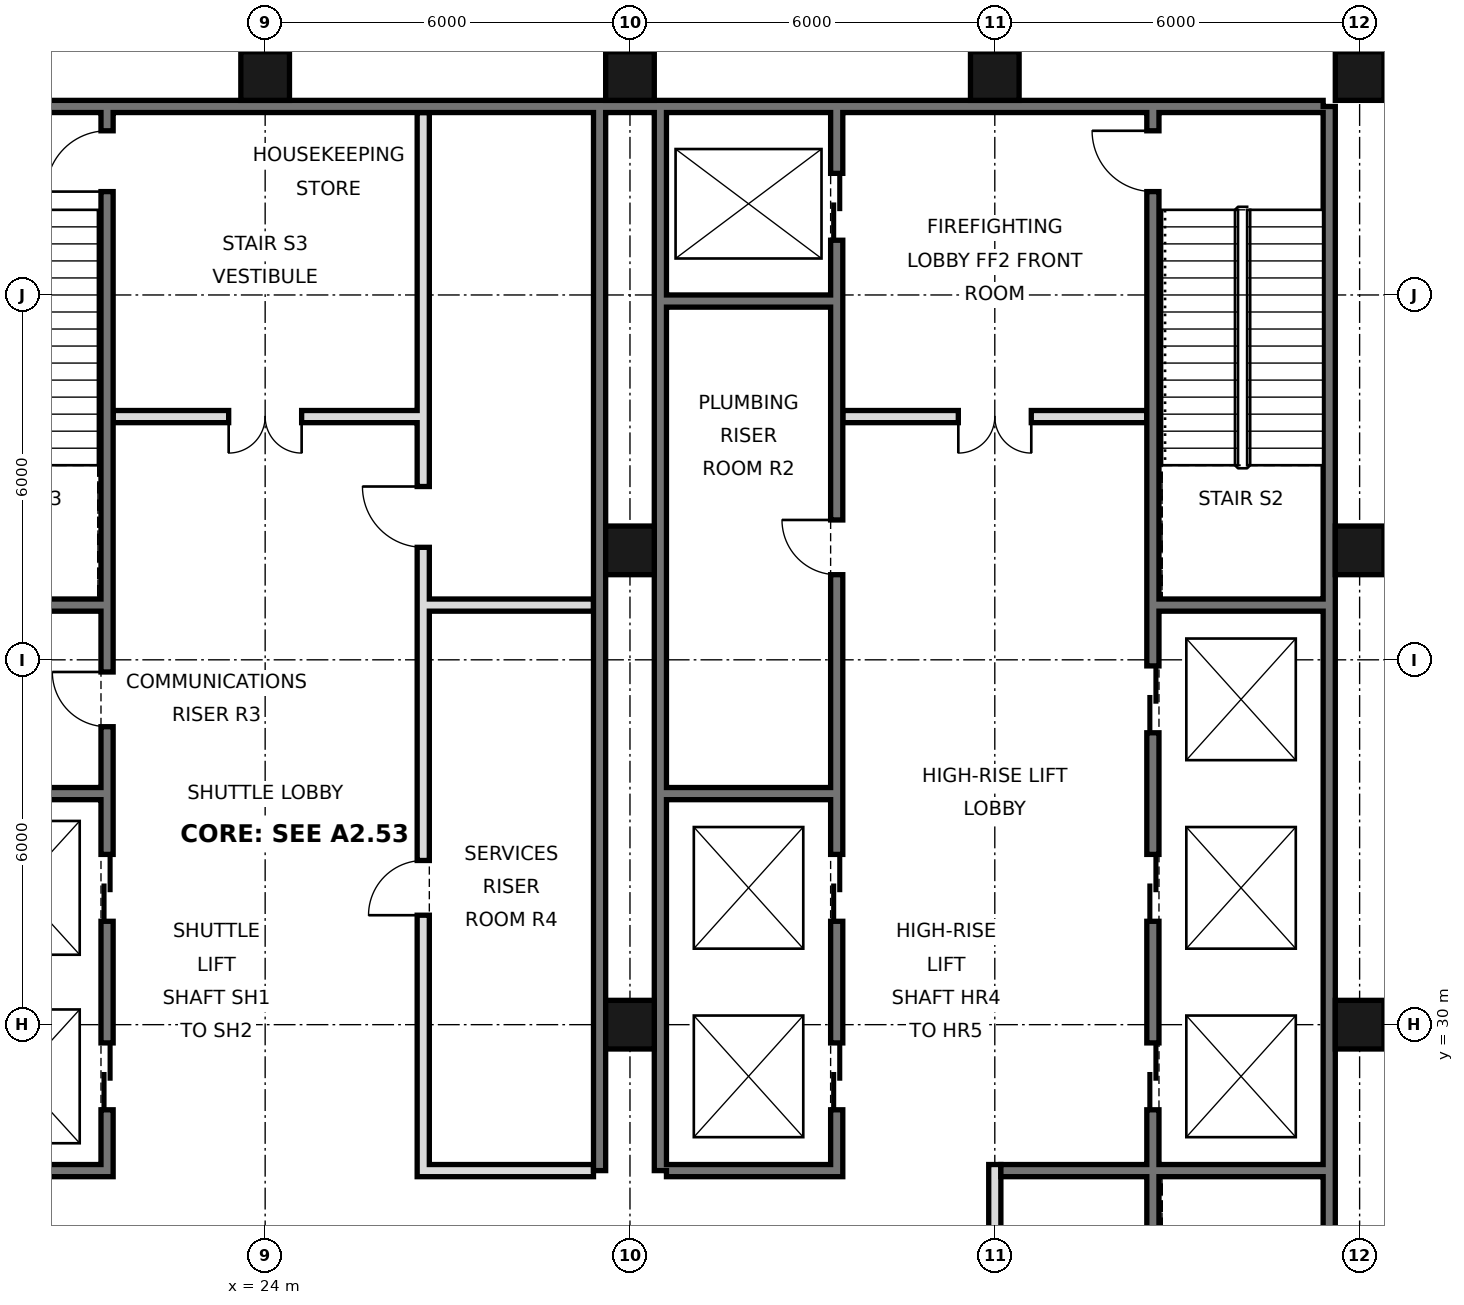
"""IFC4 building model, lengths in metres.
Left out: names, types, materials, properties, quantities, classifications, styles, units other than length and angle.
Written with IfcOpenShell. Run it as: python <this file> out.ifc"""

import sys

from ifc_helpers import new_model, si_unit, direction, frame, frame_2d, origin, origin_2d, place, context, subcontext, project, spatial, rectangle, hollow_rectangle, extrude, element, fill, save


model = new_model("IFC4")
c1 = context("Model", 3, precision=1e-05, world=origin(), true_north=direction((0.0, 1.0)))
c2 = subcontext(c1, "Body", "Model", "MODEL_VIEW")
j1 = project(units=[si_unit("LENGTHUNIT", "METRE"), si_unit("PLANEANGLEUNIT", "RADIAN")], contexts=[c1])
p1 = place(None, origin())
s1 = spatial("IfcSite", under=j1, at=p1, CompositionType="ELEMENT")
p2 = place(p1, origin())
s2 = spatial("IfcBuilding", under=s1, at=p2, CompositionType="ELEMENT")
p3 = place(p2, frame((0.0, 0.0, 210.0)))
s3 = spatial("IfcBuildingStorey", under=s2, at=p3, CompositionType="ELEMENT", Elevation=210.0)
for number, where, z_axis, x_axis in (
    (1, (24.0, 45.6, 0.0), (0.0, 0.0, 1.0), (1.0, 0.0, 0.0)),
    (2, (30.0, 30.0, 0.0), (0.0, 0.0, 1.0), (1.0, 0.0, 0.0)),
    (3, (30.0, 37.8, 0.0), (0.0, 0.0, 1.0), (1.0, 0.0, 0.0)),
    (4, (30.0, 45.6, 0.0), (0.0, 0.0, 1.0), (1.0, 0.0, 0.0)),
    (5, (36.0, 45.6, 0.0), (0.0, 0.0, 1.0), (1.0, 0.0, 0.0)),
    (6, (42.0, 30.0, 0.0), (0.0, 0.0, 1.0), (1.0, 0.0, 0.0)),
    (7, (42.0, 37.8, 0.0), (0.0, 0.0, 1.0), (1.0, 0.0, 0.0)),
    (8, (42.0, 45.6, 0.0), (0.0, 0.0, 1.0), (1.0, 0.0, 0.0)),
):
    element("IfcColumn", number, at=place(p3, frame(where, z_axis=z_axis, x_axis=x_axis)), inside=s3, PredefinedType="COLUMN", context=c2, shape_type="SweptSolid", body=[
        extrude(hollow_rectangle(XDim=0.8, YDim=0.8, WallThickness=0.04, at=origin_2d()), origin(), (0.0, 0.0, 1.0), 5.4),
    ])
p4 = place(p3, frame((41.5, 21.6, 0.0), z_axis=(0.0, 0.0, 1.0), x_axis=(0.0, 1.0, 0.0)))
e9 = element("IfcWall", 9, at=p4, inside=s3, PredefinedType="SOLIDWALL", context=c2, shape_type="SweptSolid", body=[
    extrude(rectangle(XDim=23.5, YDim=0.2, at=frame_2d((11.75, 0.0))), origin(), (0.0, 0.0, 1.0), 5.22),
])
p5 = place(p3, frame((6.6, 45.1, 0.0), z_axis=(0.0, 0.0, 1.0), x_axis=(1.0, 0.0, 0.0)))
e10 = element("IfcWall", 10, at=p5, inside=s3, PredefinedType="SOLIDWALL", context=c2, shape_type="SweptSolid", body=[
    extrude(rectangle(XDim=34.8, YDim=0.2, at=frame_2d((17.4, 0.0))), origin(), (0.0, 0.0, 1.0), 5.22),
])
for number, where, z_axis, x_axis in (
    (11, (29.5, 27.6, 0.0), (0.0, 0.0, 1.0), (0.0, 1.0, 0.0)),
    (12, (30.5, 27.6, 0.0), (0.0, 0.0, 1.0), (0.0, 1.0, 0.0)),
):
    element("IfcWall", number, at=place(p3, frame(where, z_axis=z_axis, x_axis=x_axis)), inside=s3, PredefinedType="SOLIDWALL", context=c2, shape_type="SweptSolid", body=[
        extrude(rectangle(XDim=17.5, YDim=0.2, at=frame_2d((8.75, 0.0))), origin(), (0.0, 0.0, 1.0), 5.22),
    ])
p6 = place(p3, frame((21.4, 27.5, 0.0), z_axis=(0.0, 0.0, 1.0), x_axis=(0.0, 1.0, 0.0)))
e13 = element("IfcWall", 13, at=p6, inside=s3, PredefinedType="SOLIDWALL", context=c2, shape_type="SweptSolid", body=[
    extrude(rectangle(XDim=17.5, YDim=0.2, at=frame_2d((8.75, 0.0))), origin(), (0.0, 0.0, 1.0), 5.22),
])
p7 = place(p6, frame((1.1, 0.0, 0.0)))
e14 = element("IfcOpeningElement", 14, at=p7, cuts=e13, PredefinedType="OPENING", context=c2, shape_type="SweptSolid", body=[
    extrude(rectangle(XDim=1.1, YDim=2.1, at=frame_2d((0.55, 1.05))), frame((0.0, 0.11, 0.0), z_axis=(0.0, -1.0, 0.0), x_axis=(1.0, 0.0, 0.0)), (0.0, 0.0, 1.0), 0.22),
])
p8 = place(p6, frame((4.2, 0.0, 0.0)))
e15 = element("IfcOpeningElement", 15, at=p8, cuts=e13, PredefinedType="OPENING", context=c2, shape_type="SweptSolid", body=[
    extrude(rectangle(XDim=1.1, YDim=2.1, at=frame_2d((0.55, 1.05))), frame((0.0, 0.11, 0.0), z_axis=(0.0, -1.0, 0.0), x_axis=(1.0, 0.0, 0.0)), (0.0, 0.0, 1.0), 0.22),
])
p9 = place(p6, frame((16.2, 0.0, 0.0)))
e16 = element("IfcOpeningElement", 16, at=p9, cuts=e13, PredefinedType="OPENING", context=c2, shape_type="SweptSolid", body=[
    extrude(rectangle(XDim=1.0, YDim=2.1, at=frame_2d((0.5, 1.05))), frame((0.0, 0.11, 0.0), z_axis=(0.0, -1.0, 0.0), x_axis=(1.0, 0.0, 0.0)), (0.0, 0.0, 1.0), 0.22),
])
p10 = place(p6, frame((7.4, 0.0, 0.0)))
e17 = element("IfcOpeningElement", 17, at=p10, cuts=e13, PredefinedType="OPENING", context=c2, shape_type="SweptSolid", body=[
    extrude(rectangle(XDim=0.9, YDim=2.1, at=frame_2d((0.45, 1.05))), frame((0.0, 0.11, 0.0), z_axis=(0.0, -1.0, 0.0), x_axis=(1.0, 0.0, 0.0)), (0.0, 0.0, 1.0), 0.22),
])
p11 = place(p3, frame((26.6, 27.5, 0.0), z_axis=(0.0, 0.0, 1.0), x_axis=(0.0, 1.0, 0.0)))
e18 = element("IfcWall", 18, at=p11, inside=s3, PredefinedType="SOLIDWALL", context=c2, shape_type="SweptSolid", body=[
    extrude(rectangle(XDim=17.5, YDim=0.2, at=frame_2d((8.75, 0.0))), origin(), (0.0, 0.0, 1.0), 5.22),
])
p12 = place(p11, frame((4.3, 0.0, 0.0)))
e19 = element("IfcOpeningElement", 19, at=p12, cuts=e18, PredefinedType="OPENING", context=c2, shape_type="SweptSolid", body=[
    extrude(rectangle(XDim=0.9, YDim=2.1, at=frame_2d((0.45, 1.05))), frame((0.0, 0.11, 0.0), z_axis=(0.0, -1.0, 0.0), x_axis=(1.0, 0.0, 0.0)), (0.0, 0.0, 1.0), 0.22),
])
p13 = place(p11, frame((10.35, 0.0, 0.0)))
e20 = element("IfcOpeningElement", 20, at=p13, cuts=e18, PredefinedType="OPENING", context=c2, shape_type="SweptSolid", body=[
    extrude(rectangle(XDim=1.0, YDim=2.1, at=frame_2d((0.5, 1.05))), frame((0.0, 0.11, 0.0), z_axis=(0.0, -1.0, 0.0), x_axis=(1.0, 0.0, 0.0)), (0.0, 0.0, 1.0), 0.22),
])
p14 = place(p3, frame((33.4, 27.5, 0.0), z_axis=(0.0, 0.0, 1.0), x_axis=(0.0, 1.0, 0.0)))
e21 = element("IfcWall", 21, at=p14, inside=s3, PredefinedType="SOLIDWALL", context=c2, shape_type="SweptSolid", body=[
    extrude(rectangle(XDim=17.5, YDim=0.2, at=frame_2d((8.75, 0.0))), origin(), (0.0, 0.0, 1.0), 5.22),
])
p15 = place(p14, frame((1.1, 0.0, 0.0)))
e22 = element("IfcOpeningElement", 22, at=p15, cuts=e21, PredefinedType="OPENING", context=c2, shape_type="SweptSolid", body=[
    extrude(rectangle(XDim=1.1, YDim=2.1, at=frame_2d((0.55, 1.05))), frame((0.0, 0.11, 0.0), z_axis=(0.0, -1.0, 0.0), x_axis=(1.0, 0.0, 0.0)), (0.0, 0.0, 1.0), 0.22),
])
p16 = place(p14, frame((4.2, 0.0, 0.0)))
e23 = element("IfcOpeningElement", 23, at=p16, cuts=e21, PredefinedType="OPENING", context=c2, shape_type="SweptSolid", body=[
    extrude(rectangle(XDim=1.1, YDim=2.1, at=frame_2d((0.55, 1.05))), frame((0.0, 0.11, 0.0), z_axis=(0.0, -1.0, 0.0), x_axis=(1.0, 0.0, 0.0)), (0.0, 0.0, 1.0), 0.22),
])
p17 = place(p14, frame((15.4, 0.0, 0.0)))
e24 = element("IfcOpeningElement", 24, at=p17, cuts=e21, PredefinedType="OPENING", context=c2, shape_type="SweptSolid", body=[
    extrude(rectangle(XDim=1.1, YDim=2.1, at=frame_2d((0.55, 1.05))), frame((0.0, 0.11, 0.0), z_axis=(0.0, -1.0, 0.0), x_axis=(1.0, 0.0, 0.0)), (0.0, 0.0, 1.0), 0.22),
])
p18 = place(p14, frame((9.9, 0.0, 0.0)))
e25 = element("IfcOpeningElement", 25, at=p18, cuts=e21, PredefinedType="OPENING", context=c2, shape_type="SweptSolid", body=[
    extrude(rectangle(XDim=0.9, YDim=2.1, at=frame_2d((0.45, 1.05))), frame((0.0, 0.11, 0.0), z_axis=(0.0, -1.0, 0.0), x_axis=(1.0, 0.0, 0.0)), (0.0, 0.0, 1.0), 0.22),
])
p19 = place(p3, frame((36.0, 21.6, 0.0), z_axis=(0.0, 0.0, 1.0), x_axis=(0.0, 1.0, 0.0)))
e26 = element("IfcWall", 26, at=p19, inside=s3, PredefinedType="PARTITIONING", context=c2, shape_type="SweptSolid", body=[
    extrude(rectangle(XDim=6.1, YDim=0.2, at=frame_2d((3.05, 0.0))), origin(), (0.0, 0.0, 1.0), 5.22),
])
p20 = place(p3, frame((38.6, 21.6, 0.0), z_axis=(0.0, 0.0, 1.0), x_axis=(0.0, 1.0, 0.0)))
e27 = element("IfcWall", 27, at=p20, inside=s3, PredefinedType="SOLIDWALL", context=c2, shape_type="SweptSolid", body=[
    extrude(rectangle(XDim=23.4, YDim=0.2, at=frame_2d((11.7, 0.0))), origin(), (0.0, 0.0, 1.0), 5.22),
])
p21 = place(p20, frame((7.0, 0.0, 0.0)))
e28 = element("IfcOpeningElement", 28, at=p21, cuts=e27, PredefinedType="OPENING", context=c2, shape_type="SweptSolid", body=[
    extrude(rectangle(XDim=1.1, YDim=2.1, at=frame_2d((0.55, 1.05))), frame((0.0, 0.11, 0.0), z_axis=(0.0, -1.0, 0.0), x_axis=(1.0, 0.0, 0.0)), (0.0, 0.0, 1.0), 0.22),
])
p22 = place(p20, frame((10.1, 0.0, 0.0)))
e29 = element("IfcOpeningElement", 29, at=p22, cuts=e27, PredefinedType="OPENING", context=c2, shape_type="SweptSolid", body=[
    extrude(rectangle(XDim=1.1, YDim=2.1, at=frame_2d((0.55, 1.05))), frame((0.0, 0.11, 0.0), z_axis=(0.0, -1.0, 0.0), x_axis=(1.0, 0.0, 0.0)), (0.0, 0.0, 1.0), 0.22),
])
p23 = place(p20, frame((13.2, 0.0, 0.0)))
e30 = element("IfcOpeningElement", 30, at=p23, cuts=e27, PredefinedType="OPENING", context=c2, shape_type="SweptSolid", body=[
    extrude(rectangle(XDim=1.1, YDim=2.1, at=frame_2d((0.55, 1.05))), frame((0.0, 0.11, 0.0), z_axis=(0.0, -1.0, 0.0), x_axis=(1.0, 0.0, 0.0)), (0.0, 0.0, 1.0), 0.22),
])
p24 = place(p20, frame((22.1, 0.0, 0.0)))
e31 = element("IfcOpeningElement", 31, at=p24, cuts=e27, PredefinedType="OPENING", context=c2, shape_type="SweptSolid", body=[
    extrude(rectangle(XDim=1.0, YDim=2.1, at=frame_2d((0.5, 1.05))), frame((0.0, 0.11, 0.0), z_axis=(0.0, -1.0, 0.0), x_axis=(1.0, 0.0, 0.0)), (0.0, 0.0, 1.0), 0.22),
])
p25 = place(p20, frame((0.175, 0.0, 0.0)))
e32 = element("IfcOpeningElement", 32, at=p25, cuts=e27, PredefinedType="OPENING", context=c2, shape_type="SweptSolid", body=[
    extrude(rectangle(XDim=0.9, YDim=2.1, at=frame_2d((0.45, 1.05))), frame((0.0, 0.11, 0.0), z_axis=(0.0, -1.0, 0.0), x_axis=(1.0, 0.0, 0.0)), (0.0, 0.0, 1.0), 0.22),
])
for number, where, z_axis, x_axis in (
    (33, (18.6, 27.6, 0.0), (0.0, 0.0, 1.0), (1.0, 0.0, 0.0)),
    (34, (26.7, 27.6, 0.0), (0.0, 0.0, 1.0), (1.0, 0.0, 0.0)),
    (35, (30.6, 27.6, 0.0), (0.0, 0.0, 1.0), (1.0, 0.0, 0.0)),
):
    element("IfcWall", number, at=place(p3, frame(where, z_axis=z_axis, x_axis=x_axis)), inside=s3, PredefinedType="SOLIDWALL", context=c2, shape_type="SweptSolid", body=[
        extrude(rectangle(XDim=2.7, YDim=0.2, at=frame_2d((1.35, 0.0))), origin(), (0.0, 0.0, 1.0), 5.22),
    ])
p26 = place(p3, frame((36.1, 27.6, 0.0), z_axis=(0.0, 0.0, 1.0), x_axis=(1.0, 0.0, 0.0)))
e36 = element("IfcWall", 36, at=p26, inside=s3, PredefinedType="SOLIDWALL", context=c2, shape_type="SweptSolid", body=[
    extrude(rectangle(XDim=5.3, YDim=0.2, at=frame_2d((2.65, 0.0))), origin(), (0.0, 0.0, 1.0), 5.22),
])
for number, where, z_axis, x_axis in (
    (37, (18.6, 33.8, 0.0), (0.0, 0.0, 1.0), (1.0, 0.0, 0.0)),
    (38, (30.6, 33.8, 0.0), (0.0, 0.0, 1.0), (1.0, 0.0, 0.0)),
    (39, (18.6, 36.9, 0.0), (0.0, 0.0, 1.0), (1.0, 0.0, 0.0)),
    (40, (26.7, 36.9, 0.0), (0.0, 0.0, 1.0), (1.0, 0.0, 0.0)),
    (41, (38.7, 36.9, 0.0), (0.0, 0.0, 1.0), (1.0, 0.0, 0.0)),
):
    element("IfcWall", number, at=place(p3, frame(where, z_axis=z_axis, x_axis=x_axis)), inside=s3, PredefinedType="SOLIDWALL", context=c2, shape_type="SweptSolid", body=[
        extrude(rectangle(XDim=2.7, YDim=0.2, at=frame_2d((1.35, 0.0))), origin(), (0.0, 0.0, 1.0), 5.22),
    ])
p27 = place(p3, frame((21.5, 40.0, 0.0), z_axis=(0.0, 0.0, 1.0), x_axis=(1.0, 0.0, 0.0)))
e42 = element("IfcWall", 42, at=p27, inside=s3, PredefinedType="PARTITIONING", context=c2, shape_type="SweptSolid", body=[
    extrude(rectangle(XDim=5.0, YDim=0.2, at=frame_2d((2.5, 0.0))), origin(), (0.0, 0.0, 1.0), 5.22),
])
p28 = place(p27, frame((1.9, 0.0, 0.0)))
e43 = element("IfcOpeningElement", 43, at=p28, cuts=e42, PredefinedType="OPENING", context=c2, shape_type="SweptSolid", body=[
    extrude(rectangle(XDim=1.2, YDim=2.1, at=frame_2d((0.6, 1.05))), frame((0.0, 0.11, 0.0), z_axis=(0.0, -1.0, 0.0), x_axis=(1.0, 0.0, 0.0)), (0.0, 0.0, 1.0), 0.22),
])
p29 = place(p3, frame((33.5, 40.0, 0.0), z_axis=(0.0, 0.0, 1.0), x_axis=(1.0, 0.0, 0.0)))
e44 = element("IfcWall", 44, at=p29, inside=s3, PredefinedType="PARTITIONING", context=c2, shape_type="SweptSolid", body=[
    extrude(rectangle(XDim=5.0, YDim=0.2, at=frame_2d((2.5, 0.0))), origin(), (0.0, 0.0, 1.0), 5.22),
])
p30 = place(p29, frame((1.9, 0.0, 0.0)))
e45 = element("IfcOpeningElement", 45, at=p30, cuts=e44, PredefinedType="OPENING", context=c2, shape_type="SweptSolid", body=[
    extrude(rectangle(XDim=1.2, YDim=2.1, at=frame_2d((0.6, 1.05))), frame((0.0, 0.11, 0.0), z_axis=(0.0, -1.0, 0.0), x_axis=(1.0, 0.0, 0.0)), (0.0, 0.0, 1.0), 0.22),
])
p31 = place(p3, frame((30.6, 41.9, 0.0), z_axis=(0.0, 0.0, 1.0), x_axis=(1.0, 0.0, 0.0)))
e46 = element("IfcWall", 46, at=p31, inside=s3, PredefinedType="SOLIDWALL", context=c2, shape_type="SweptSolid", body=[
    extrude(rectangle(XDim=2.7, YDim=0.2, at=frame_2d((1.35, 0.0))), origin(), (0.0, 0.0, 1.0), 5.22),
])
p32 = place(p28, frame((1.2, 0.0, 0.0), z_axis=(0.0, 0.0, 1.0), x_axis=(-1.0, 0.0, 0.0)))
e47 = element("IfcDoor", 47, at=p32, inside=s3, OperationType="DOUBLE_DOOR_SINGLE_SWING", PredefinedType="DOOR", context=c2, shape_type="SweptSolid", body=[
    extrude(rectangle(XDim=1.2, YDim=2.1, at=frame_2d((0.6, 1.05))), frame((0.0, 0.025, 0.0), z_axis=(0.0, -1.0, 0.0), x_axis=(1.0, 0.0, 0.0)), (0.0, 0.0, 1.0), 0.05),
])
fill(e43, e47)
p33 = place(p30, frame((1.2, 0.0, 0.0), z_axis=(0.0, 0.0, 1.0), x_axis=(-1.0, 0.0, 0.0)))
e48 = element("IfcDoor", 48, at=p33, inside=s3, OperationType="DOUBLE_DOOR_SINGLE_SWING", PredefinedType="DOOR", context=c2, shape_type="SweptSolid", body=[
    extrude(rectangle(XDim=1.2, YDim=2.1, at=frame_2d((0.6, 1.05))), frame((0.0, 0.025, 0.0), z_axis=(0.0, -1.0, 0.0), x_axis=(1.0, 0.0, 0.0)), (0.0, 0.0, 1.0), 0.05),
])
fill(e45, e48)
p34 = place(p7, origin())
e49 = element("IfcDoor", 49, at=p34, inside=s3, OperationType="DOUBLE_DOOR_SLIDING", PredefinedType="DOOR", context=c2, shape_type="SweptSolid", body=[
    extrude(rectangle(XDim=1.1, YDim=2.1, at=frame_2d((0.55, 1.05))), frame((0.0, 0.025, 0.0), z_axis=(0.0, -1.0, 0.0), x_axis=(1.0, 0.0, 0.0)), (0.0, 0.0, 1.0), 0.05),
])
fill(e14, e49)
p35 = place(p8, origin())
e50 = element("IfcDoor", 50, at=p35, inside=s3, OperationType="DOUBLE_DOOR_SLIDING", PredefinedType="DOOR", context=c2, shape_type="SweptSolid", body=[
    extrude(rectangle(XDim=1.1, YDim=2.1, at=frame_2d((0.55, 1.05))), frame((0.0, 0.025, 0.0), z_axis=(0.0, -1.0, 0.0), x_axis=(1.0, 0.0, 0.0)), (0.0, 0.0, 1.0), 0.05),
])
fill(e15, e50)
p36 = place(p21, origin())
e51 = element("IfcDoor", 51, at=p36, inside=s3, OperationType="DOUBLE_DOOR_SLIDING", PredefinedType="DOOR", context=c2, shape_type="SweptSolid", body=[
    extrude(rectangle(XDim=1.1, YDim=2.1, at=frame_2d((0.55, 1.05))), frame((0.0, 0.025, 0.0), z_axis=(0.0, -1.0, 0.0), x_axis=(1.0, 0.0, 0.0)), (0.0, 0.0, 1.0), 0.05),
])
fill(e28, e51)
p37 = place(p22, origin())
e52 = element("IfcDoor", 52, at=p37, inside=s3, OperationType="DOUBLE_DOOR_SLIDING", PredefinedType="DOOR", context=c2, shape_type="SweptSolid", body=[
    extrude(rectangle(XDim=1.1, YDim=2.1, at=frame_2d((0.55, 1.05))), frame((0.0, 0.025, 0.0), z_axis=(0.0, -1.0, 0.0), x_axis=(1.0, 0.0, 0.0)), (0.0, 0.0, 1.0), 0.05),
])
fill(e29, e52)
p38 = place(p23, origin())
e53 = element("IfcDoor", 53, at=p38, inside=s3, OperationType="DOUBLE_DOOR_SLIDING", PredefinedType="DOOR", context=c2, shape_type="SweptSolid", body=[
    extrude(rectangle(XDim=1.1, YDim=2.1, at=frame_2d((0.55, 1.05))), frame((0.0, 0.025, 0.0), z_axis=(0.0, -1.0, 0.0), x_axis=(1.0, 0.0, 0.0)), (0.0, 0.0, 1.0), 0.05),
])
fill(e30, e53)
p39 = place(p15, origin())
e54 = element("IfcDoor", 54, at=p39, inside=s3, OperationType="DOUBLE_DOOR_SLIDING", PredefinedType="DOOR", context=c2, shape_type="SweptSolid", body=[
    extrude(rectangle(XDim=1.1, YDim=2.1, at=frame_2d((0.55, 1.05))), frame((0.0, 0.025, 0.0), z_axis=(0.0, -1.0, 0.0), x_axis=(1.0, 0.0, 0.0)), (0.0, 0.0, 1.0), 0.05),
])
fill(e22, e54)
p40 = place(p16, origin())
e55 = element("IfcDoor", 55, at=p40, inside=s3, OperationType="DOUBLE_DOOR_SLIDING", PredefinedType="DOOR", context=c2, shape_type="SweptSolid", body=[
    extrude(rectangle(XDim=1.1, YDim=2.1, at=frame_2d((0.55, 1.05))), frame((0.0, 0.025, 0.0), z_axis=(0.0, -1.0, 0.0), x_axis=(1.0, 0.0, 0.0)), (0.0, 0.0, 1.0), 0.05),
])
fill(e23, e55)
p41 = place(p17, origin())
e56 = element("IfcDoor", 56, at=p41, inside=s3, OperationType="DOUBLE_DOOR_SLIDING", PredefinedType="DOOR", context=c2, shape_type="SweptSolid", body=[
    extrude(rectangle(XDim=1.1, YDim=2.1, at=frame_2d((0.55, 1.05))), frame((0.0, 0.025, 0.0), z_axis=(0.0, -1.0, 0.0), x_axis=(1.0, 0.0, 0.0)), (0.0, 0.0, 1.0), 0.05),
])
fill(e24, e56)
p42 = place(p24, frame((1.0, 0.0, 0.0), z_axis=(0.0, 0.0, 1.0), x_axis=(-1.0, 0.0, 0.0)))
e57 = element("IfcDoor", 57, at=p42, inside=s3, OperationType="SINGLE_SWING_LEFT", PredefinedType="DOOR", context=c2, shape_type="SweptSolid", body=[
    extrude(rectangle(XDim=1.0, YDim=2.1, at=frame_2d((0.5, 1.05))), frame((0.0, 0.025, 0.0), z_axis=(0.0, -1.0, 0.0), x_axis=(1.0, 0.0, 0.0)), (0.0, 0.0, 1.0), 0.05),
])
fill(e31, e57)
p43 = place(p9, origin())
e58 = element("IfcDoor", 58, at=p43, inside=s3, OperationType="SINGLE_SWING_LEFT", PredefinedType="DOOR", context=c2, shape_type="SweptSolid", body=[
    extrude(rectangle(XDim=1.0, YDim=2.1, at=frame_2d((0.5, 1.05))), frame((0.0, 0.025, 0.0), z_axis=(0.0, -1.0, 0.0), x_axis=(1.0, 0.0, 0.0)), (0.0, 0.0, 1.0), 0.05),
])
fill(e16, e58)
p44 = place(p18, frame((0.9, 0.0, 0.0), z_axis=(0.0, 0.0, 1.0), x_axis=(-1.0, 0.0, 0.0)))
e59 = element("IfcDoor", 59, at=p44, inside=s3, OperationType="SINGLE_SWING_LEFT", PredefinedType="DOOR", context=c2, shape_type="SweptSolid", body=[
    extrude(rectangle(XDim=0.9, YDim=2.1, at=frame_2d((0.45, 1.05))), frame((0.0, 0.025, 0.0), z_axis=(0.0, -1.0, 0.0), x_axis=(1.0, 0.0, 0.0)), (0.0, 0.0, 1.0), 0.05),
])
fill(e25, e59)
p45 = place(p10, frame((0.9, 0.0, 0.0), z_axis=(0.0, 0.0, 1.0), x_axis=(-1.0, 0.0, 0.0)))
e60 = element("IfcDoor", 60, at=p45, inside=s3, OperationType="SINGLE_SWING_LEFT", PredefinedType="DOOR", context=c2, shape_type="SweptSolid", body=[
    extrude(rectangle(XDim=0.9, YDim=2.1, at=frame_2d((0.45, 1.05))), frame((0.0, 0.025, 0.0), z_axis=(0.0, -1.0, 0.0), x_axis=(1.0, 0.0, 0.0)), (0.0, 0.0, 1.0), 0.05),
])
fill(e17, e60)
p46 = place(p12, origin())
e61 = element("IfcDoor", 61, at=p46, inside=s3, OperationType="SINGLE_SWING_LEFT", PredefinedType="DOOR", context=c2, shape_type="SweptSolid", body=[
    extrude(rectangle(XDim=0.9, YDim=2.1, at=frame_2d((0.45, 1.05))), frame((0.0, 0.025, 0.0), z_axis=(0.0, -1.0, 0.0), x_axis=(1.0, 0.0, 0.0)), (0.0, 0.0, 1.0), 0.05),
])
fill(e19, e61)
p47 = place(p13, frame((1.0, 0.0, 0.0), z_axis=(0.0, 0.0, 1.0), x_axis=(-1.0, 0.0, 0.0)))
e62 = element("IfcDoor", 62, at=p47, inside=s3, OperationType="SINGLE_SWING_LEFT", PredefinedType="DOOR", context=c2, shape_type="SweptSolid", body=[
    extrude(rectangle(XDim=1.0, YDim=2.1, at=frame_2d((0.5, 1.05))), frame((0.0, 0.025, 0.0), z_axis=(0.0, -1.0, 0.0), x_axis=(1.0, 0.0, 0.0)), (0.0, 0.0, 1.0), 0.05),
])
fill(e20, e62)
save(model, sys.argv[1])
